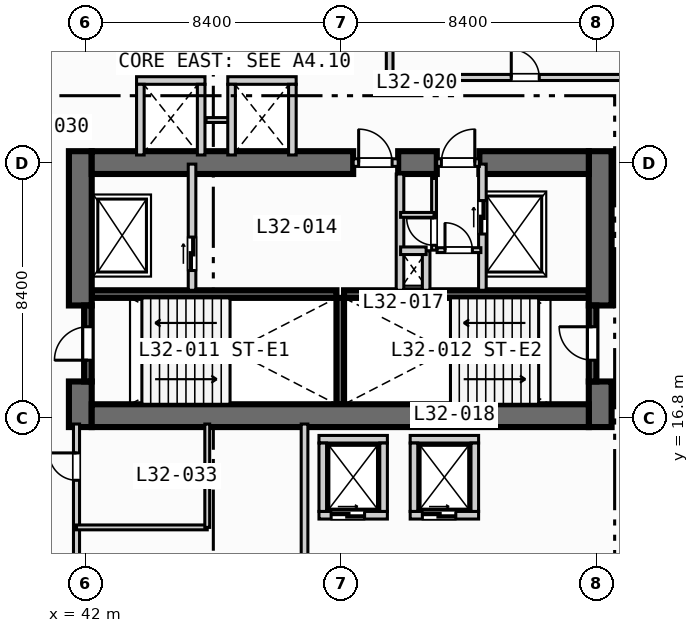
"""IFC4 building model, lengths in metres.
Left out: names, types, materials, properties, quantities, classifications, styles, units other than length and angle.
Written with IfcOpenShell. Run it as: python <this file> out.ifc"""

import sys

from ifc_helpers import new_model, si_unit, direction, frame, frame_2d, origin, place, context, subcontext, project, spatial, rectangle, extrude, element, fill, save


model = new_model("IFC4")
c1 = context("Model", 3, precision=1e-05, world=origin(), true_north=direction((0.0, 1.0)))
c2 = subcontext(c1, "Body", "Model", "MODEL_VIEW")
j1 = project(units=[si_unit("LENGTHUNIT", "METRE"), si_unit("PLANEANGLEUNIT", "RADIAN")], contexts=[c1])
p1 = place(None, origin())
s1 = spatial("IfcSite", under=j1, at=p1, CompositionType="ELEMENT")
p2 = place(p1, origin())
s2 = spatial("IfcBuilding", under=s1, at=p2, CompositionType="ELEMENT")
p3 = place(p2, frame((0.0, 0.0, 134.2)))
s3 = spatial("IfcBuildingStorey", under=s2, at=p3, CompositionType="ELEMENT", Elevation=134.2)
for number, where, z_axis, x_axis in (
    (1, (42.2, 20.875, 0.0), (0.0, 0.0, 1.0), (1.0, 0.0, 0.0)),
    (2, (50.5, 20.875, 0.0), (0.0, 0.0, 1.0), (1.0, 0.0, 0.0)),
):
    element("IfcWall", number, at=place(p3, frame(where, z_axis=z_axis, x_axis=x_axis)), inside=s3, PredefinedType="SOLIDWALL", context=c2, shape_type="SweptSolid", body=[
        extrude(rectangle(XDim=8.05, YDim=0.25, at=frame_2d((4.025, 0.0))), origin(), (0.0, 0.0, 1.0), 3.55),
    ])
p4 = place(p3, frame((50.375, 17.25, 0.0), z_axis=(0.0, 0.0, 1.0), x_axis=(0.0, 1.0, 0.0)))
e3 = element("IfcWall", 3, at=p4, inside=s3, PredefinedType="SOLIDWALL", context=c2, shape_type="SweptSolid", body=[
    extrude(rectangle(XDim=3.5, YDim=0.25, at=frame_2d((1.75, 0.0))), origin(), (0.0, 0.0, 1.0), 3.55),
])
p5 = place(p3, frame((41.825, 16.5, 0.0), z_axis=(0.0, 0.0, 1.0), x_axis=(0.0, 1.0, 0.0)))
e4 = element("IfcWall", 4, at=p5, inside=s3, PredefinedType="SHEAR", context=c2, shape_type="SweptSolid", body=[
    extrude(rectangle(XDim=1.5, YDim=0.75, at=frame_2d((0.75, 0.0))), origin(), (0.0, 0.0, 1.0), 3.55),
])
p6 = place(p3, frame((41.825, 20.5, 0.0), z_axis=(0.0, 0.0, 1.0), x_axis=(0.0, 1.0, 0.0)))
e5 = element("IfcWall", 5, at=p6, inside=s3, PredefinedType="SHEAR", context=c2, shape_type="SweptSolid", body=[
    extrude(rectangle(XDim=5.075, YDim=0.75, at=frame_2d((2.538, 0.0))), origin(), (0.0, 0.0, 1.0), 3.55),
])
p7 = place(p3, frame((58.925, 16.5, 0.0), z_axis=(0.0, 0.0, 1.0), x_axis=(0.0, 1.0, 0.0)))
e6 = element("IfcWall", 6, at=p7, inside=s3, PredefinedType="SHEAR", context=c2, shape_type="SweptSolid", body=[
    extrude(rectangle(XDim=1.5, YDim=0.75, at=frame_2d((0.75, 0.0))), origin(), (0.0, 0.0, 1.0), 3.55),
])
p8 = place(p3, frame((58.925, 20.5, 0.0), z_axis=(0.0, 0.0, 1.0), x_axis=(0.0, 1.0, 0.0)))
e7 = element("IfcWall", 7, at=p8, inside=s3, PredefinedType="SHEAR", context=c2, shape_type="SweptSolid", body=[
    extrude(rectangle(XDim=5.075, YDim=0.75, at=frame_2d((2.538, 0.0))), origin(), (0.0, 0.0, 1.0), 3.55),
])
p9 = place(p3, frame((42.2, 16.875, 0.0), z_axis=(0.0, 0.0, 1.0), x_axis=(1.0, 0.0, 0.0)))
e8 = element("IfcWall", 8, at=p9, inside=s3, PredefinedType="SHEAR", context=c2, shape_type="SweptSolid", body=[
    extrude(rectangle(XDim=16.35, YDim=0.75, at=frame_2d((8.175, 0.0))), origin(), (0.0, 0.0, 1.0), 3.55),
])
p10 = place(p3, frame((42.2, 25.2, 0.0), z_axis=(0.0, 0.0, 1.0), x_axis=(1.0, 0.0, 0.0)))
e9 = element("IfcWall", 9, at=p10, inside=s3, PredefinedType="SHEAR", context=c2, shape_type="SweptSolid", body=[
    extrude(rectangle(XDim=8.6, YDim=0.75, at=frame_2d((4.3, 0.0))), origin(), (0.0, 0.0, 1.0), 3.55),
])
p11 = place(p3, frame((52.28, 25.2, 0.0), z_axis=(0.0, 0.0, 1.0), x_axis=(1.0, 0.0, 0.0)))
e10 = element("IfcWall", 10, at=p11, inside=s3, PredefinedType="SHEAR", context=c2, shape_type="SweptSolid", body=[
    extrude(rectangle(XDim=1.27, YDim=0.75, at=frame_2d((0.635, 0.0))), origin(), (0.0, 0.0, 1.0), 3.55),
])
p12 = place(p3, frame((54.95, 25.2, 0.0), z_axis=(0.0, 0.0, 1.0), x_axis=(1.0, 0.0, 0.0)))
e11 = element("IfcWall", 11, at=p12, inside=s3, PredefinedType="SHEAR", context=c2, shape_type="SweptSolid", body=[
    extrude(rectangle(XDim=3.6, YDim=0.75, at=frame_2d((1.8, 0.0))), origin(), (0.0, 0.0, 1.0), 3.55),
])
p13 = place(p3, frame((42.075, 18.0, 0.0), z_axis=(0.0, 0.0, 1.0), x_axis=(0.0, 1.0, 0.0)))
e12 = element("IfcWall", 12, at=p13, inside=s3, PredefinedType="SOLIDWALL", context=c2, shape_type="SweptSolid", body=[
    extrude(rectangle(XDim=2.5, YDim=0.25, at=frame_2d((1.25, 0.0))), origin(), (0.0, 0.0, 1.0), 3.55),
])
p14 = place(p13, frame((0.7, 0.0, 0.0)))
e13 = element("IfcOpeningElement", 13, at=p14, cuts=e12, PredefinedType="OPENING", context=c2, shape_type="SweptSolid", body=[
    extrude(rectangle(XDim=1.1, YDim=2.15, at=frame_2d((0.55, 1.075))), frame((0.0, 0.135, 0.0), z_axis=(0.0, -1.0, 0.0), x_axis=(1.0, 0.0, 0.0)), (0.0, 0.0, 1.0), 0.27),
])
p15 = place(p3, frame((58.675, 18.0, 0.0), z_axis=(0.0, 0.0, 1.0), x_axis=(0.0, 1.0, 0.0)))
e14 = element("IfcWall", 14, at=p15, inside=s3, PredefinedType="SOLIDWALL", context=c2, shape_type="SweptSolid", body=[
    extrude(rectangle(XDim=2.5, YDim=0.25, at=frame_2d((1.25, 0.0))), origin(), (0.0, 0.0, 1.0), 3.55),
])
p16 = place(p15, frame((0.7, 0.0, 0.0)))
e15 = element("IfcOpeningElement", 15, at=p16, cuts=e14, PredefinedType="OPENING", context=c2, shape_type="SweptSolid", body=[
    extrude(rectangle(XDim=1.1, YDim=2.15, at=frame_2d((0.55, 1.075))), frame((0.0, 0.135, 0.0), z_axis=(0.0, -1.0, 0.0), x_axis=(1.0, 0.0, 0.0)), (0.0, 0.0, 1.0), 0.27),
])
p17 = place(p3, frame((45.5, 21.0, 0.0), z_axis=(0.0, 0.0, 1.0), x_axis=(0.0, 1.0, 0.0)))
e16 = element("IfcWall", 16, at=p17, inside=s3, PredefinedType="SOLIDWALL", context=c2, shape_type="SweptSolid", body=[
    extrude(rectangle(XDim=4.15, YDim=0.25, at=frame_2d((2.075, 0.0))), origin(), (0.0, 0.0, 1.0), 3.55),
])
p18 = place(p17, frame((0.65, 0.0, 0.0)))
e17 = element("IfcOpeningElement", 17, at=p18, cuts=e16, PredefinedType="OPENING", context=c2, shape_type="SweptSolid", body=[
    extrude(rectangle(XDim=1.1, YDim=2.15, at=frame_2d((0.55, 1.075))), frame((0.0, 0.135, 0.0), z_axis=(0.0, -1.0, 0.0), x_axis=(1.0, 0.0, 0.0)), (0.0, 0.0, 1.0), 0.27),
])
p19 = place(p3, frame((50.8, 25.2, 0.0), z_axis=(0.0, 0.0, 1.0), x_axis=(1.0, 0.0, 0.0)))
e18 = element("IfcWall", 18, at=p19, inside=s3, PredefinedType="SOLIDWALL", context=c2, shape_type="SweptSolid", body=[
    extrude(rectangle(XDim=1.48, YDim=0.25, at=frame_2d((0.74, 0.0))), origin(), (0.0, 0.0, 1.0), 3.55),
])
p20 = place(p19, frame((0.18, 0.0, 0.0)))
e19 = element("IfcOpeningElement", 19, at=p20, cuts=e18, PredefinedType="OPENING", context=c2, shape_type="SweptSolid", body=[
    extrude(rectangle(XDim=1.1, YDim=2.15, at=frame_2d((0.55, 1.075))), frame((0.0, 0.135, 0.0), z_axis=(0.0, -1.0, 0.0), x_axis=(1.0, 0.0, 0.0)), (0.0, 0.0, 1.0), 0.27),
])
p21 = place(p3, frame((52.34, 21.0, 0.0), z_axis=(0.0, 0.0, 1.0), x_axis=(0.0, 1.0, 0.0)))
e20 = element("IfcWall", 20, at=p21, inside=s3, PredefinedType="SOLIDWALL", context=c2, shape_type="SweptSolid", body=[
    extrude(rectangle(XDim=3.825, YDim=0.25, at=frame_2d((1.913, 0.0))), origin(), (0.0, 0.0, 1.0), 3.55),
])
p22 = place(p3, frame((55.05, 21.0, 0.0), z_axis=(0.0, 0.0, 1.0), x_axis=(0.0, 1.0, 0.0)))
e21 = element("IfcWall", 21, at=p22, inside=s3, PredefinedType="SOLIDWALL", context=c2, shape_type="SweptSolid", body=[
    extrude(rectangle(XDim=4.15, YDim=0.25, at=frame_2d((2.075, 0.0))), origin(), (0.0, 0.0, 1.0), 3.55),
])
p23 = place(p22, frame((1.85, 0.0, 0.0)))
e22 = element("IfcOpeningElement", 22, at=p23, cuts=e21, PredefinedType="OPENING", context=c2, shape_type="SweptSolid", body=[
    extrude(rectangle(XDim=1.1, YDim=2.15, at=frame_2d((0.55, 1.075))), frame((0.0, 0.135, 0.0), z_axis=(0.0, -1.0, 0.0), x_axis=(1.0, 0.0, 0.0)), (0.0, 0.0, 1.0), 0.27),
])
p24 = place(p3, frame((53.55, 25.2, 0.0), z_axis=(0.0, 0.0, 1.0), x_axis=(1.0, 0.0, 0.0)))
e23 = element("IfcWall", 23, at=p24, inside=s3, PredefinedType="SOLIDWALL", context=c2, shape_type="SweptSolid", body=[
    extrude(rectangle(XDim=1.4, YDim=0.25, at=frame_2d((0.7, 0.0))), origin(), (0.0, 0.0, 1.0), 3.55),
])
p25 = place(p24, frame((0.15, 0.0, 0.0)))
e24 = element("IfcOpeningElement", 24, at=p25, cuts=e23, PredefinedType="OPENING", context=c2, shape_type="SweptSolid", body=[
    extrude(rectangle(XDim=1.1, YDim=2.15, at=frame_2d((0.55, 1.075))), frame((0.0, 0.135, 0.0), z_axis=(0.0, -1.0, 0.0), x_axis=(1.0, 0.0, 0.0)), (0.0, 0.0, 1.0), 0.27),
])
p26 = place(p3, frame((53.2, 21.0, 0.0), z_axis=(0.0, 0.0, 1.0), x_axis=(0.0, 1.0, 0.0)))
e25 = element("IfcWall", 25, at=p26, inside=s3, PredefinedType="SOLIDWALL", context=c2, shape_type="SweptSolid", body=[
    extrude(rectangle(XDim=1.3, YDim=0.25, at=frame_2d((0.65, 0.0))), origin(), (0.0, 0.0, 1.0), 3.55),
])
p27 = place(p3, frame((52.36, 22.3, 0.0), z_axis=(0.0, 0.0, 1.0), x_axis=(1.0, 0.0, 0.0)))
e26 = element("IfcWall", 26, at=p27, inside=s3, PredefinedType="SOLIDWALL", context=c2, shape_type="SweptSolid", body=[
    extrude(rectangle(XDim=0.84, YDim=0.25, at=frame_2d((0.42, 0.0))), origin(), (0.0, 0.0, 1.0), 3.55),
])
p28 = place(p3, frame((53.56, 22.32, 0.0), z_axis=(0.0, 0.0, 1.0), x_axis=(1.0, 0.0, 0.0)))
e27 = element("IfcWall", 27, at=p28, inside=s3, PredefinedType="PARTITIONING", context=c2, shape_type="SweptSolid", body=[
    extrude(rectangle(XDim=1.44, YDim=0.16, at=frame_2d((0.72, 0.0))), origin(), (0.0, 0.0, 1.0), 3.55),
])
p29 = place(p28, frame((0.26, 0.0, 0.0)))
e28 = element("IfcOpeningElement", 28, at=p29, cuts=e27, PredefinedType="OPENING", context=c2, shape_type="SweptSolid", body=[
    extrude(rectangle(XDim=0.9, YDim=2.1, at=frame_2d((0.45, 1.05))), frame((0.0, 0.09, 0.0), z_axis=(0.0, -1.0, 0.0), x_axis=(1.0, 0.0, 0.0)), (0.0, 0.0, 1.0), 0.18),
])
p30 = place(p3, frame((53.46, 22.32, 0.0), z_axis=(0.0, 0.0, 1.0), x_axis=(0.0, 1.0, 0.0)))
e29 = element("IfcWall", 29, at=p30, inside=s3, PredefinedType="PARTITIONING", context=c2, shape_type="SweptSolid", body=[
    extrude(rectangle(XDim=2.36, YDim=0.16, at=frame_2d((1.18, 0.0))), origin(), (0.0, 0.0, 1.0), 3.55),
])
p31 = place(p30, frame((0.16, 0.0, 0.0)))
e30 = element("IfcOpeningElement", 30, at=p31, cuts=e29, PredefinedType="OPENING", context=c2, shape_type="SweptSolid", body=[
    extrude(rectangle(XDim=0.9, YDim=2.1, at=frame_2d((0.45, 1.05))), frame((0.0, 0.09, 0.0), z_axis=(0.0, -1.0, 0.0), x_axis=(1.0, 0.0, 0.0)), (0.0, 0.0, 1.0), 0.18),
])
p32 = place(p3, frame((52.36, 23.48, 0.0), z_axis=(0.0, 0.0, 1.0), x_axis=(1.0, 0.0, 0.0)))
e31 = element("IfcWall", 31, at=p32, inside=s3, PredefinedType="PARTITIONING", context=c2, shape_type="SweptSolid", body=[
    extrude(rectangle(XDim=1.1, YDim=0.16, at=frame_2d((0.55, 0.0))), origin(), (0.0, 0.0, 1.0), 3.55),
])
p33 = place(p3, frame((49.675, 13.6, 0.0), z_axis=(0.0, 0.0, 1.0), x_axis=(1.0, 0.0, 0.0)))
e32 = element("IfcWall", 32, at=p33, inside=s3, PredefinedType="SOLIDWALL", context=c2, shape_type="SweptSolid", body=[
    extrude(rectangle(XDim=2.25, YDim=0.25, at=frame_2d((1.125, 0.0))), origin(), (0.0, 0.0, 1.0), 3.55),
])
p34 = place(p33, frame((0.4, 0.0, 0.0)))
e33 = element("IfcOpeningElement", 33, at=p34, cuts=e32, PredefinedType="OPENING", context=c2, shape_type="SweptSolid", body=[
    extrude(rectangle(XDim=1.1, YDim=2.15, at=frame_2d((0.55, 1.075))), frame((0.0, 0.135, 0.0), z_axis=(0.0, -1.0, 0.0), x_axis=(1.0, 0.0, 0.0)), (0.0, 0.0, 1.0), 0.27),
])
for number, where, z_axis, x_axis in (
    (34, (49.675, 16.1, 0.0), (0.0, 0.0, 1.0), (1.0, 0.0, 0.0)),
    (35, (49.8, 13.725, 0.0), (0.0, 0.0, 1.0), (0.0, 1.0, 0.0)),
    (36, (51.8, 13.725, 0.0), (0.0, 0.0, 1.0), (0.0, 1.0, 0.0)),
):
    element("IfcWall", number, at=place(p3, frame(where, z_axis=z_axis, x_axis=x_axis)), inside=s3, PredefinedType="SOLIDWALL", context=c2, shape_type="SweptSolid", body=[
        extrude(rectangle(XDim=2.25, YDim=0.25, at=frame_2d((1.125, 0.0))), origin(), (0.0, 0.0, 1.0), 3.55),
    ])
p35 = place(p3, frame((52.675, 13.6, 0.0), z_axis=(0.0, 0.0, 1.0), x_axis=(1.0, 0.0, 0.0)))
e37 = element("IfcWall", 37, at=p35, inside=s3, PredefinedType="SOLIDWALL", context=c2, shape_type="SweptSolid", body=[
    extrude(rectangle(XDim=2.25, YDim=0.25, at=frame_2d((1.125, 0.0))), origin(), (0.0, 0.0, 1.0), 3.55),
])
p36 = place(p35, frame((0.4, 0.0, 0.0)))
e38 = element("IfcOpeningElement", 38, at=p36, cuts=e37, PredefinedType="OPENING", context=c2, shape_type="SweptSolid", body=[
    extrude(rectangle(XDim=1.1, YDim=2.15, at=frame_2d((0.55, 1.075))), frame((0.0, 0.135, 0.0), z_axis=(0.0, -1.0, 0.0), x_axis=(1.0, 0.0, 0.0)), (0.0, 0.0, 1.0), 0.27),
])
for number, where, z_axis, x_axis in (
    (39, (52.675, 16.1, 0.0), (0.0, 0.0, 1.0), (1.0, 0.0, 0.0)),
    (40, (52.8, 13.725, 0.0), (0.0, 0.0, 1.0), (0.0, 1.0, 0.0)),
    (41, (54.8, 13.725, 0.0), (0.0, 0.0, 1.0), (0.0, 1.0, 0.0)),
    (42, (43.675, 27.9, 0.0), (0.0, 0.0, 1.0), (1.0, 0.0, 0.0)),
):
    element("IfcWall", number, at=place(p3, frame(where, z_axis=z_axis, x_axis=x_axis)), inside=s3, PredefinedType="SOLIDWALL", context=c2, shape_type="SweptSolid", body=[
        extrude(rectangle(XDim=2.25, YDim=0.25, at=frame_2d((1.125, 0.0))), origin(), (0.0, 0.0, 1.0), 3.55),
    ])
for number, where, z_axis, x_axis in (
    (43, (43.8, 25.45, 0.0), (0.0, 0.0, 1.0), (0.0, 1.0, 0.0)),
    (44, (45.8, 25.45, 0.0), (0.0, 0.0, 1.0), (0.0, 1.0, 0.0)),
):
    element("IfcWall", number, at=place(p3, frame(where, z_axis=z_axis, x_axis=x_axis)), inside=s3, PredefinedType="SOLIDWALL", context=c2, shape_type="SweptSolid", body=[
        extrude(rectangle(XDim=2.325, YDim=0.25, at=frame_2d((1.163, 0.0))), origin(), (0.0, 0.0, 1.0), 3.55),
    ])
p37 = place(p3, frame((45.96, 26.6, 0.0), z_axis=(0.0, 0.0, 1.0), x_axis=(1.0, 0.0, 0.0)))
e45 = element("IfcWall", 45, at=p37, inside=s3, PredefinedType="PARTITIONING", context=c2, shape_type="SweptSolid", body=[
    extrude(rectangle(XDim=0.88, YDim=0.16, at=frame_2d((0.44, 0.0))), origin(), (0.0, 0.0, 1.0), 3.55),
])
p38 = place(p3, frame((46.675, 27.9, 0.0), z_axis=(0.0, 0.0, 1.0), x_axis=(1.0, 0.0, 0.0)))
e46 = element("IfcWall", 46, at=p38, inside=s3, PredefinedType="SOLIDWALL", context=c2, shape_type="SweptSolid", body=[
    extrude(rectangle(XDim=2.25, YDim=0.25, at=frame_2d((1.125, 0.0))), origin(), (0.0, 0.0, 1.0), 3.55),
])
for number, where, z_axis, x_axis in (
    (47, (46.8, 25.45, 0.0), (0.0, 0.0, 1.0), (0.0, 1.0, 0.0)),
    (48, (48.8, 25.45, 0.0), (0.0, 0.0, 1.0), (0.0, 1.0, 0.0)),
):
    element("IfcWall", number, at=place(p3, frame(where, z_axis=z_axis, x_axis=x_axis)), inside=s3, PredefinedType="SOLIDWALL", context=c2, shape_type="SweptSolid", body=[
        extrude(rectangle(XDim=2.325, YDim=0.25, at=frame_2d((1.163, 0.0))), origin(), (0.0, 0.0, 1.0), 3.55),
    ])
p39 = place(p3, frame((41.7, 0.35, 0.0), z_axis=(0.0, 0.0, 1.0), x_axis=(0.0, 1.0, 0.0)))
e49 = element("IfcWall", 49, at=p39, inside=s3, PredefinedType="PARTITIONING", context=c2, shape_type="SweptSolid", body=[
    extrude(rectangle(XDim=16.25, YDim=0.2, at=frame_2d((8.125, 0.0))), origin(), (0.0, 0.0, 1.0), 2.8),
])
p40 = place(p39, frame((5.0, 0.0, 0.0)))
e50 = element("IfcOpeningElement", 50, at=p40, cuts=e49, PredefinedType="OPENING", context=c2, shape_type="SweptSolid", body=[
    extrude(rectangle(XDim=0.92, YDim=2.1, at=frame_2d((0.46, 1.05))), frame((0.0, 0.11, 0.0), z_axis=(0.0, -1.0, 0.0), x_axis=(1.0, 0.0, 0.0)), (0.0, 0.0, 1.0), 0.22),
])
p41 = place(p39, frame((14.4, 0.0, 0.0)))
e51 = element("IfcOpeningElement", 51, at=p41, cuts=e49, PredefinedType="OPENING", context=c2, shape_type="SweptSolid", body=[
    extrude(rectangle(XDim=0.9, YDim=2.1, at=frame_2d((0.45, 1.05))), frame((0.0, 0.11, 0.0), z_axis=(0.0, -1.0, 0.0), x_axis=(1.0, 0.0, 0.0)), (0.0, 0.0, 1.0), 0.22),
])
p42 = place(p3, frame((49.2, 0.35, 0.0), z_axis=(0.0, 0.0, 1.0), x_axis=(0.0, 1.0, 0.0)))
e52 = element("IfcWall", 52, at=p42, inside=s3, PredefinedType="PARTITIONING", context=c2, shape_type="SweptSolid", body=[
    extrude(rectangle(XDim=16.25, YDim=0.22, at=frame_2d((8.125, 0.0))), origin(), (0.0, 0.0, 1.0), 3.55),
])
p43 = place(p3, frame((41.7, 13.2, 0.0), z_axis=(0.0, 0.0, 1.0), x_axis=(1.0, 0.0, 0.0)))
e53 = element("IfcWall", 53, at=p43, inside=s3, PredefinedType="PARTITIONING", context=c2, shape_type="SweptSolid", body=[
    extrude(rectangle(XDim=4.3, YDim=0.16, at=frame_2d((2.15, 0.0))), origin(), (0.0, 0.0, 1.0), 3.55),
])
p44 = place(p3, frame((46.0, 13.2, 0.0), z_axis=(0.0, 0.0, 1.0), x_axis=(0.0, 1.0, 0.0)))
e54 = element("IfcWall", 54, at=p44, inside=s3, PredefinedType="PARTITIONING", context=c2, shape_type="SweptSolid", body=[
    extrude(rectangle(XDim=3.4, YDim=0.16, at=frame_2d((1.7, 0.0))), origin(), (0.0, 0.0, 1.0), 3.55),
])
p45 = place(p3, frame((52.0, 28.0, 0.0), z_axis=(0.0, 0.0, 1.0), x_axis=(1.0, 0.0, 0.0)))
e55 = element("IfcWall", 55, at=p45, inside=s3, PredefinedType="PARTITIONING", context=c2, shape_type="SweptSolid", body=[
    extrude(rectangle(XDim=23.25, YDim=0.2, at=frame_2d((11.625, 0.0))), origin(), (0.0, 0.0, 1.0), 3.55),
])
p46 = place(p45, frame((4.0, 0.0, 0.0)))
e56 = element("IfcOpeningElement", 56, at=p46, cuts=e55, PredefinedType="OPENING", context=c2, shape_type="SweptSolid", body=[
    extrude(rectangle(XDim=0.92, YDim=2.1, at=frame_2d((0.46, 1.05))), frame((0.0, 0.11, 0.0), z_axis=(0.0, -1.0, 0.0), x_axis=(1.0, 0.0, 0.0)), (0.0, 0.0, 1.0), 0.22),
])
p47 = place(p3, frame((52.0, 28.0, 0.0), z_axis=(0.0, 0.0, 1.0), x_axis=(0.0, 1.0, 0.0)))
e57 = element("IfcWall", 57, at=p47, inside=s3, PredefinedType="PARTITIONING", context=c2, shape_type="SweptSolid", body=[
    extrude(rectangle(XDim=5.3, YDim=0.22, at=frame_2d((2.65, 0.0))), origin(), (0.0, 0.0, 1.0), 3.55),
])
p48 = place(p14, origin())
e58 = element("IfcDoor", 58, at=p48, inside=s3, OperationType="SINGLE_SWING_LEFT", PredefinedType="DOOR", context=c2, shape_type="SweptSolid", body=[
    extrude(rectangle(XDim=1.1, YDim=2.15, at=frame_2d((0.55, 1.075))), frame((0.0, 0.025, 0.0), z_axis=(0.0, -1.0, 0.0), x_axis=(1.0, 0.0, 0.0)), (0.0, 0.0, 1.0), 0.05),
])
fill(e13, e58)
p49 = place(p16, origin())
e59 = element("IfcDoor", 59, at=p49, inside=s3, OperationType="SINGLE_SWING_RIGHT", PredefinedType="DOOR", context=c2, shape_type="SweptSolid", body=[
    extrude(rectangle(XDim=1.1, YDim=2.15, at=frame_2d((0.55, 1.075))), frame((0.0, 0.025, 0.0), z_axis=(0.0, -1.0, 0.0), x_axis=(1.0, 0.0, 0.0)), (0.0, 0.0, 1.0), 0.05),
])
fill(e15, e59)
p50 = place(p18, origin())
e60 = element("IfcDoor", 60, at=p50, inside=s3, OperationType="SLIDING_TO_LEFT", PredefinedType="DOOR", context=c2, shape_type="SweptSolid", body=[
    extrude(rectangle(XDim=1.1, YDim=2.15, at=frame_2d((0.55, 1.075))), frame((0.0, 0.025, 0.0), z_axis=(0.0, -1.0, 0.0), x_axis=(1.0, 0.0, 0.0)), (0.0, 0.0, 1.0), 0.05),
])
fill(e17, e60)
p51 = place(p20, origin())
e61 = element("IfcDoor", 61, at=p51, inside=s3, OperationType="SINGLE_SWING_LEFT", PredefinedType="DOOR", context=c2, shape_type="SweptSolid", body=[
    extrude(rectangle(XDim=1.1, YDim=2.15, at=frame_2d((0.55, 1.075))), frame((0.0, 0.025, 0.0), z_axis=(0.0, -1.0, 0.0), x_axis=(1.0, 0.0, 0.0)), (0.0, 0.0, 1.0), 0.05),
])
fill(e19, e61)
p52 = place(p23, origin())
e62 = element("IfcDoor", 62, at=p52, inside=s3, OperationType="SLIDING_TO_LEFT", PredefinedType="DOOR", context=c2, shape_type="SweptSolid", body=[
    extrude(rectangle(XDim=1.1, YDim=2.15, at=frame_2d((0.55, 1.075))), frame((0.0, 0.025, 0.0), z_axis=(0.0, -1.0, 0.0), x_axis=(1.0, 0.0, 0.0)), (0.0, 0.0, 1.0), 0.05),
])
fill(e22, e62)
p53 = place(p25, origin())
e63 = element("IfcDoor", 63, at=p53, inside=s3, OperationType="SINGLE_SWING_RIGHT", PredefinedType="DOOR", context=c2, shape_type="SweptSolid", body=[
    extrude(rectangle(XDim=1.1, YDim=2.15, at=frame_2d((0.55, 1.075))), frame((0.0, 0.025, 0.0), z_axis=(0.0, -1.0, 0.0), x_axis=(1.0, 0.0, 0.0)), (0.0, 0.0, 1.0), 0.05),
])
fill(e24, e63)
p54 = place(p29, origin())
e64 = element("IfcDoor", 64, at=p54, inside=s3, OperationType="SINGLE_SWING_LEFT", PredefinedType="DOOR", context=c2, shape_type="SweptSolid", body=[
    extrude(rectangle(XDim=0.9, YDim=2.1, at=frame_2d((0.45, 1.05))), frame((0.0, 0.025, 0.0), z_axis=(0.0, -1.0, 0.0), x_axis=(1.0, 0.0, 0.0)), (0.0, 0.0, 1.0), 0.05),
])
fill(e28, e64)
p55 = place(p31, origin())
e65 = element("IfcDoor", 65, at=p55, inside=s3, OperationType="SINGLE_SWING_RIGHT", PredefinedType="DOOR", context=c2, shape_type="SweptSolid", body=[
    extrude(rectangle(XDim=0.9, YDim=2.1, at=frame_2d((0.45, 1.05))), frame((0.0, 0.025, 0.0), z_axis=(0.0, -1.0, 0.0), x_axis=(1.0, 0.0, 0.0)), (0.0, 0.0, 1.0), 0.05),
])
fill(e30, e65)
p56 = place(p34, origin())
e66 = element("IfcDoor", 66, at=p56, inside=s3, OperationType="SLIDING_TO_LEFT", PredefinedType="DOOR", context=c2, shape_type="SweptSolid", body=[
    extrude(rectangle(XDim=1.1, YDim=2.15, at=frame_2d((0.55, 1.075))), frame((0.0, 0.025, 0.0), z_axis=(0.0, -1.0, 0.0), x_axis=(1.0, 0.0, 0.0)), (0.0, 0.0, 1.0), 0.05),
])
fill(e33, e66)
p57 = place(p36, origin())
e67 = element("IfcDoor", 67, at=p57, inside=s3, OperationType="SLIDING_TO_LEFT", PredefinedType="DOOR", context=c2, shape_type="SweptSolid", body=[
    extrude(rectangle(XDim=1.1, YDim=2.15, at=frame_2d((0.55, 1.075))), frame((0.0, 0.025, 0.0), z_axis=(0.0, -1.0, 0.0), x_axis=(1.0, 0.0, 0.0)), (0.0, 0.0, 1.0), 0.05),
])
fill(e38, e67)
p58 = place(p41, origin())
e68 = element("IfcDoor", 68, at=p58, inside=s3, OperationType="SINGLE_SWING_RIGHT", PredefinedType="DOOR", context=c2, shape_type="SweptSolid", body=[
    extrude(rectangle(XDim=0.9, YDim=2.1, at=frame_2d((0.45, 1.05))), frame((0.0, 0.025, 0.0), z_axis=(0.0, -1.0, 0.0), x_axis=(1.0, 0.0, 0.0)), (0.0, 0.0, 1.0), 0.05),
])
fill(e51, e68)
p59 = place(p46, origin())
e69 = element("IfcDoor", 69, at=p59, inside=s3, OperationType="SINGLE_SWING_LEFT", PredefinedType="DOOR", context=c2, shape_type="SweptSolid", body=[
    extrude(rectangle(XDim=0.92, YDim=2.1, at=frame_2d((0.46, 1.05))), frame((0.0, 0.025, 0.0), z_axis=(0.0, -1.0, 0.0), x_axis=(1.0, 0.0, 0.0)), (0.0, 0.0, 1.0), 0.05),
])
fill(e56, e69)
save(model, sys.argv[1])
